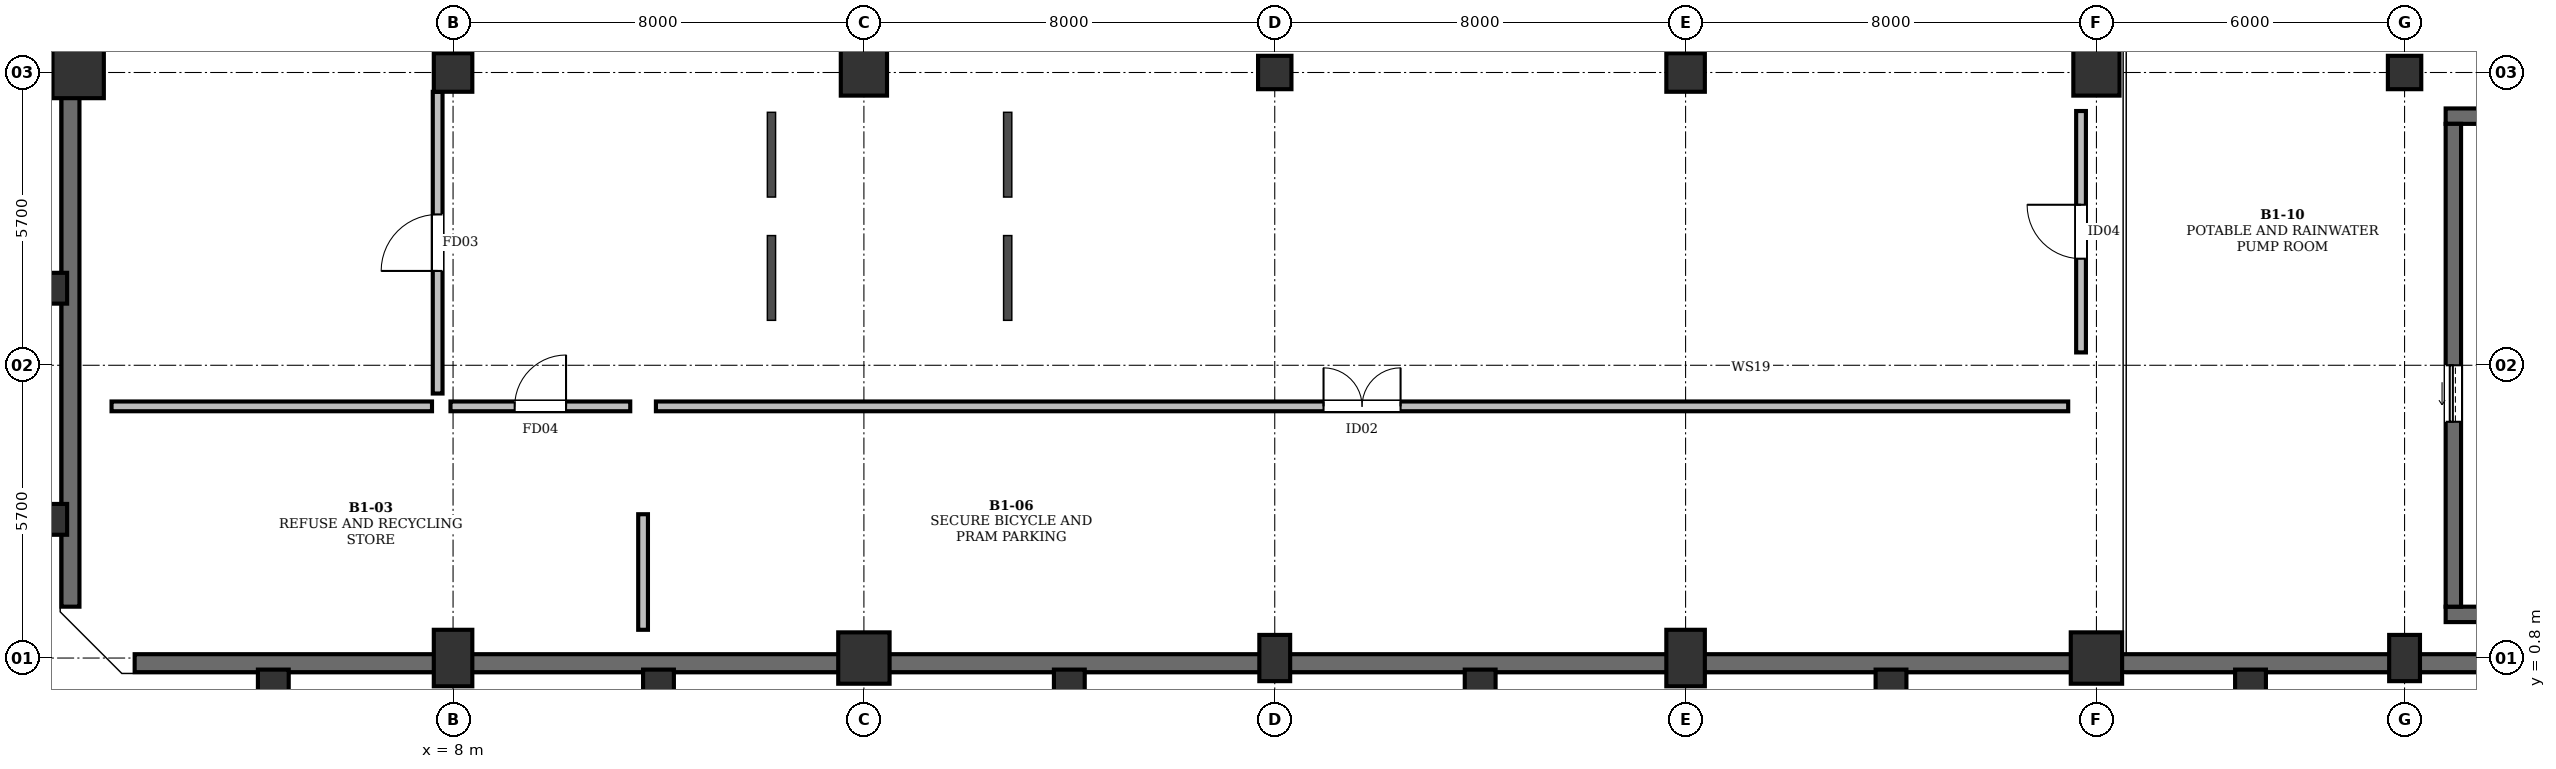
"""IFC4 building model, lengths in metres.
Left out: names, types, materials, properties, quantities, classifications, styles, units other than length and angle.
Written with IfcOpenShell. Run it as: python <this file> out.ifc"""

import sys

from ifc_helpers import new_model, si_unit, direction, frame, frame_2d, origin, origin_2d, place, context, subcontext, project, spatial, rectangle, extrude, element, fill, save


model = new_model("IFC4")
c1 = context("Model", 3, precision=1e-05, world=origin(), true_north=direction((0.0, 1.0)))
c2 = subcontext(c1, "Body", "Model", "MODEL_VIEW")
j1 = project(units=[si_unit("LENGTHUNIT", "METRE"), si_unit("PLANEANGLEUNIT", "RADIAN")], contexts=[c1])
p1 = place(None, origin())
s1 = spatial("IfcSite", under=j1, at=p1, CompositionType="ELEMENT")
p2 = place(p1, origin())
s2 = spatial("IfcBuilding", under=s1, at=p2, CompositionType="ELEMENT")
p3 = place(p2, frame((0.0, 0.0, -4.8)))
s3 = spatial("IfcBuildingStorey", under=s2, at=p3, CompositionType="ELEMENT", Elevation=-4.8)
p4 = place(p3, frame((0.7, 12.2, 0.0), z_axis=(0.0, 0.0, 1.0), x_axis=(1.0, 0.0, 0.0)))
e1 = element("IfcColumn", 1, at=p4, inside=s3, PredefinedType="COLUMN", context=c2, shape_type="SweptSolid", body=[
    extrude(rectangle(XDim=1.0, YDim=1.0, at=origin_2d()), origin(), (0.0, 0.0, 1.0), 4.8),
])
p5 = place(p3, frame((8.0, 0.8, 0.0), z_axis=(0.0, 0.0, 1.0), x_axis=(1.0, 0.0, 0.0)))
e2 = element("IfcColumn", 2, at=p5, inside=s3, PredefinedType="COLUMN", context=c2, shape_type="SweptSolid", body=[
    extrude(rectangle(XDim=0.75, YDim=1.1, at=origin_2d()), origin(), (0.0, 0.0, 1.0), 4.8),
])
p6 = place(p3, frame((8.0, 12.2, 0.0), z_axis=(0.0, 0.0, 1.0), x_axis=(1.0, 0.0, 0.0)))
e3 = element("IfcColumn", 3, at=p6, inside=s3, PredefinedType="COLUMN", context=c2, shape_type="SweptSolid", body=[
    extrude(rectangle(XDim=0.75, YDim=0.75, at=origin_2d()), origin(), (0.0, 0.0, 1.0), 4.8),
])
p7 = place(p3, frame((16.0, 0.8, 0.0), z_axis=(0.0, 0.0, 1.0), x_axis=(1.0, 0.0, 0.0)))
e4 = element("IfcColumn", 4, at=p7, inside=s3, PredefinedType="COLUMN", context=c2, shape_type="SweptSolid", body=[
    extrude(rectangle(XDim=1.0, YDim=1.0, at=origin_2d()), origin(), (0.0, 0.0, 1.0), 4.8),
])
p8 = place(p3, frame((16.0, 12.2, 0.0), z_axis=(0.0, 0.0, 1.0), x_axis=(1.0, 0.0, 0.0)))
e5 = element("IfcColumn", 5, at=p8, inside=s3, PredefinedType="COLUMN", context=c2, shape_type="SweptSolid", body=[
    extrude(rectangle(XDim=0.9, YDim=0.9, at=origin_2d()), origin(), (0.0, 0.0, 1.0), 4.8),
])
p9 = place(p3, frame((24.0, 0.8, 0.0), z_axis=(0.0, 0.0, 1.0), x_axis=(1.0, 0.0, 0.0)))
e6 = element("IfcColumn", 6, at=p9, inside=s3, PredefinedType="COLUMN", context=c2, shape_type="SweptSolid", body=[
    extrude(rectangle(XDim=0.6, YDim=0.9, at=origin_2d()), origin(), (0.0, 0.0, 1.0), 4.8),
])
p10 = place(p3, frame((24.0, 12.2, 0.0), z_axis=(0.0, 0.0, 1.0), x_axis=(1.0, 0.0, 0.0)))
e7 = element("IfcColumn", 7, at=p10, inside=s3, PredefinedType="COLUMN", context=c2, shape_type="SweptSolid", body=[
    extrude(rectangle(XDim=0.65, YDim=0.65, at=origin_2d()), origin(), (0.0, 0.0, 1.0), 4.8),
])
p11 = place(p3, frame((32.0, 0.8, 0.0), z_axis=(0.0, 0.0, 1.0), x_axis=(1.0, 0.0, 0.0)))
e8 = element("IfcColumn", 8, at=p11, inside=s3, PredefinedType="COLUMN", context=c2, shape_type="SweptSolid", body=[
    extrude(rectangle(XDim=0.75, YDim=1.1, at=origin_2d()), origin(), (0.0, 0.0, 1.0), 4.8),
])
p12 = place(p3, frame((32.0, 12.2, 0.0), z_axis=(0.0, 0.0, 1.0), x_axis=(1.0, 0.0, 0.0)))
e9 = element("IfcColumn", 9, at=p12, inside=s3, PredefinedType="COLUMN", context=c2, shape_type="SweptSolid", body=[
    extrude(rectangle(XDim=0.75, YDim=0.75, at=origin_2d()), origin(), (0.0, 0.0, 1.0), 4.8),
])
p13 = place(p3, frame((40.0, 0.8, 0.0), z_axis=(0.0, 0.0, 1.0), x_axis=(1.0, 0.0, 0.0)))
e10 = element("IfcColumn", 10, at=p13, inside=s3, PredefinedType="COLUMN", context=c2, shape_type="SweptSolid", body=[
    extrude(rectangle(XDim=1.0, YDim=1.0, at=origin_2d()), origin(), (0.0, 0.0, 1.0), 4.8),
])
p14 = place(p3, frame((40.0, 12.2, 0.0), z_axis=(0.0, 0.0, 1.0), x_axis=(1.0, 0.0, 0.0)))
e11 = element("IfcColumn", 11, at=p14, inside=s3, PredefinedType="COLUMN", context=c2, shape_type="SweptSolid", body=[
    extrude(rectangle(XDim=0.9, YDim=0.9, at=origin_2d()), origin(), (0.0, 0.0, 1.0), 4.8),
])
p15 = place(p3, frame((46.0, 0.8, 0.0), z_axis=(0.0, 0.0, 1.0), x_axis=(1.0, 0.0, 0.0)))
e12 = element("IfcColumn", 12, at=p15, inside=s3, PredefinedType="COLUMN", context=c2, shape_type="SweptSolid", body=[
    extrude(rectangle(XDim=0.6, YDim=0.9, at=origin_2d()), origin(), (0.0, 0.0, 1.0), 4.8),
])
p16 = place(p3, frame((46.0, 12.2, 0.0), z_axis=(0.0, 0.0, 1.0), x_axis=(1.0, 0.0, 0.0)))
e13 = element("IfcColumn", 13, at=p16, inside=s3, PredefinedType="COLUMN", context=c2, shape_type="SweptSolid", body=[
    extrude(rectangle(XDim=0.65, YDim=0.65, at=origin_2d()), origin(), (0.0, 0.0, 1.0), 4.8),
])
p17 = place(p3, frame((0.55, 1.8, 0.0), z_axis=(0.0, 0.0, 1.0), x_axis=(0.0, 1.0, 0.0)))
e14 = element("IfcWall", 14, at=p17, inside=s3, PredefinedType="SHEAR", context=c2, shape_type="SweptSolid", body=[
    extrude(rectangle(XDim=100.4, YDim=0.35, at=frame_2d((50.2, 0.0))), origin(), (0.0, 0.0, 1.0), 4.52),
])
p18 = place(p3, frame((1.8, 0.7, 0.0), z_axis=(0.0, 0.0, 1.0), x_axis=(1.0, 0.0, 0.0)))
e15 = element("IfcWall", 15, at=p18, inside=s3, PredefinedType="SHEAR", context=c2, shape_type="SweptSolid", body=[
    extrude(rectangle(XDim=173.2, YDim=0.35, at=frame_2d((86.6, 0.0))), origin(), (0.0, 0.0, 1.0), 4.52),
])
for number, where, z_axis, x_axis in (
    (16, (0.26, 3.5, 0.0), (0.0, 0.0, 1.0), (1.0, 0.0, 0.0)),
    (17, (0.26, 8.0, 0.0), (0.0, 0.0, 1.0), (1.0, 0.0, 0.0)),
    (18, (4.5, 0.35, 0.0), (0.0, 0.0, 1.0), (0.0, 1.0, 0.0)),
    (19, (12.0, 0.35, 0.0), (0.0, 0.0, 1.0), (0.0, 1.0, 0.0)),
    (20, (20.0, 0.35, 0.0), (0.0, 0.0, 1.0), (0.0, 1.0, 0.0)),
    (21, (28.0, 0.35, 0.0), (0.0, 0.0, 1.0), (0.0, 1.0, 0.0)),
    (22, (36.0, 0.35, 0.0), (0.0, 0.0, 1.0), (0.0, 1.0, 0.0)),
    (23, (43.0, 0.35, 0.0), (0.0, 0.0, 1.0), (0.0, 1.0, 0.0)),
):
    element("IfcColumn", number, at=place(p3, frame(where, z_axis=z_axis, x_axis=x_axis)), inside=s3, PredefinedType="PILASTER", context=c2, shape_type="SweptSolid", body=[
        extrude(rectangle(XDim=0.45, YDim=0.6, at=origin_2d()), origin(), (0.0, 0.0, 1.0), 4.8),
    ])
for number, where, z_axis, x_axis in (
    (24, (46.8, 1.65, 0.0), (0.0, 0.0, 1.0), (1.0, 0.0, 0.0)),
    (25, (46.8, 11.35, 0.0), (0.0, 0.0, 1.0), (1.0, 0.0, 0.0)),
):
    element("IfcWall", number, at=place(p3, frame(where, z_axis=z_axis, x_axis=x_axis)), inside=s3, PredefinedType="SHEAR", context=c2, shape_type="SweptSolid", body=[
        extrude(rectangle(XDim=8.0, YDim=0.3, at=frame_2d((4.0, 0.0))), origin(), (0.0, 0.0, 1.0), 4.52),
    ])
p19 = place(p3, frame((46.95, 1.8, 0.0), z_axis=(0.0, 0.0, 1.0), x_axis=(0.0, 1.0, 0.0)))
e26 = element("IfcWall", 26, at=p19, inside=s3, PredefinedType="SHEAR", context=c2, shape_type="SweptSolid", body=[
    extrude(rectangle(XDim=9.4, YDim=0.3, at=frame_2d((4.7, 0.0))), origin(), (0.0, 0.0, 1.0), 4.52),
])
p20 = place(p19, frame((3.6, 0.0, 0.0)))
e27 = element("IfcOpeningElement", 27, at=p20, cuts=e26, PredefinedType="OPENING", context=c2, shape_type="SweptSolid", body=[
    extrude(rectangle(XDim=1.1, YDim=2.2, at=frame_2d((0.55, 1.1))), frame((0.0, 0.162, 0.0), z_axis=(0.0, -1.0, 0.0), x_axis=(1.0, 0.0, 0.0)), (0.0, 0.0, 1.0), 0.324),
])
p21 = place(p3, frame((7.7, 5.95, 0.0), z_axis=(0.0, 0.0, 1.0), x_axis=(0.0, 1.0, 0.0)))
e28 = element("IfcWall", 28, at=p21, inside=s3, PredefinedType="SOLIDWALL", context=c2, shape_type="SweptSolid", body=[
    extrude(rectangle(XDim=5.873, YDim=0.19, at=frame_2d((2.937, 0.0))), origin(), (0.0, 0.0, 1.0), 3.255),
])
p22 = place(p21, frame((2.386, 0.0, 0.0)))
e29 = element("IfcOpeningElement", 29, at=p22, cuts=e28, PredefinedType="OPENING", context=c2, shape_type="SweptSolid", body=[
    extrude(rectangle(XDim=1.1, YDim=2.2, at=frame_2d((0.55, 1.1))), frame((0.0, 0.107, 0.0), z_axis=(0.0, -1.0, 0.0), x_axis=(1.0, 0.0, 0.0)), (0.0, 0.0, 1.0), 0.214),
])
p23 = place(p3, frame((7.95, 5.7, 0.0), z_axis=(0.0, 0.0, 1.0), x_axis=(1.0, 0.0, 0.0)))
e30 = element("IfcWall", 30, at=p23, inside=s3, PredefinedType="SOLIDWALL", context=c2, shape_type="SweptSolid", body=[
    extrude(rectangle(XDim=3.5, YDim=0.19, at=frame_2d((1.75, 0.0))), origin(), (0.0, 0.0, 1.0), 3.605),
])
p24 = place(p23, frame((1.25, 0.0, 0.0)))
e31 = element("IfcOpeningElement", 31, at=p24, cuts=e30, PredefinedType="OPENING", context=c2, shape_type="SweptSolid", body=[
    extrude(rectangle(XDim=1.0, YDim=2.2, at=frame_2d((0.5, 1.1))), frame((0.0, 0.107, 0.0), z_axis=(0.0, -1.0, 0.0), x_axis=(1.0, 0.0, 0.0)), (0.0, 0.0, 1.0), 0.214),
])
p25 = place(p3, frame((11.95, 5.7, 0.0), z_axis=(0.0, 0.0, 1.0), x_axis=(1.0, 0.0, 0.0)))
e32 = element("IfcWall", 32, at=p25, inside=s3, PredefinedType="SOLIDWALL", context=c2, shape_type="SweptSolid", body=[
    extrude(rectangle(XDim=27.5, YDim=0.19, at=frame_2d((13.75, 0.0))), origin(), (0.0, 0.0, 1.0), 3.605),
])
p26 = place(p25, frame((13.0, 0.0, 0.0)))
e33 = element("IfcOpeningElement", 33, at=p26, cuts=e32, PredefinedType="OPENING", context=c2, shape_type="SweptSolid", body=[
    extrude(rectangle(XDim=1.5, YDim=2.2, at=frame_2d((0.75, 1.1))), frame((0.0, 0.107, 0.0), z_axis=(0.0, -1.0, 0.0), x_axis=(1.0, 0.0, 0.0)), (0.0, 0.0, 1.0), 0.214),
])
p27 = place(p3, frame((39.7, 6.75, 0.0), z_axis=(0.0, 0.0, 1.0), x_axis=(0.0, 1.0, 0.0)))
e34 = element("IfcWall", 34, at=p27, inside=s3, PredefinedType="SOLIDWALL", context=c2, shape_type="SweptSolid", body=[
    extrude(rectangle(XDim=4.7, YDim=0.19, at=frame_2d((2.35, 0.0))), origin(), (0.0, 0.0, 1.0), 3.605),
])
p28 = place(p27, frame((1.825, 0.0, 0.0)))
e35 = element("IfcOpeningElement", 35, at=p28, cuts=e34, PredefinedType="OPENING", context=c2, shape_type="SweptSolid", body=[
    extrude(rectangle(XDim=1.05, YDim=2.15, at=frame_2d((0.525, 1.075))), frame((0.0, 0.107, 0.0), z_axis=(0.0, -1.0, 0.0), x_axis=(1.0, 0.0, 0.0)), (0.0, 0.0, 1.0), 0.214),
])
p29 = place(p3, frame((1.35, 5.7, 0.0), z_axis=(0.0, 0.0, 1.0), x_axis=(1.0, 0.0, 0.0)))
e36 = element("IfcWall", 36, at=p29, inside=s3, PredefinedType="SOLIDWALL", context=c2, shape_type="SweptSolid", body=[
    extrude(rectangle(XDim=6.24, YDim=0.19, at=frame_2d((3.12, 0.0))), origin(), (0.0, 0.0, 1.0), 3.605),
])
p30 = place(p3, frame((11.7, 1.35, 0.0), z_axis=(0.0, 0.0, 1.0), x_axis=(0.0, 1.0, 0.0)))
e37 = element("IfcWall", 37, at=p30, inside=s3, PredefinedType="SOLIDWALL", context=c2, shape_type="SweptSolid", body=[
    extrude(rectangle(XDim=2.25, YDim=0.19, at=frame_2d((1.125, 0.0))), origin(), (0.0, 0.0, 1.0), 4.099),
])
p31 = place(p20, origin())
e38 = element("IfcDoor", 38, at=p31, inside=s3, OperationType="SLIDING_TO_LEFT", PredefinedType="DOOR", context=c2, shape_type="SweptSolid", body=[
    extrude(rectangle(XDim=1.1, YDim=2.2, at=frame_2d((0.55, 1.1))), frame((0.0, 0.025, 0.0), z_axis=(0.0, -1.0, 0.0), x_axis=(1.0, 0.0, 0.0)), (0.0, 0.0, 1.0), 0.05),
])
fill(e27, e38)
p32 = place(p22, origin())
e39 = element("IfcDoor", 39, at=p32, inside=s3, OperationType="SINGLE_SWING_LEFT", PredefinedType="DOOR", context=c2, shape_type="SweptSolid", body=[
    extrude(rectangle(XDim=1.1, YDim=2.2, at=frame_2d((0.55, 1.1))), frame((0.0, 0.025, 0.0), z_axis=(0.0, -1.0, 0.0), x_axis=(1.0, 0.0, 0.0)), (0.0, 0.0, 1.0), 0.05),
])
fill(e29, e39)
p33 = place(p24, origin())
e40 = element("IfcDoor", 40, at=p33, inside=s3, OperationType="SINGLE_SWING_RIGHT", PredefinedType="DOOR", context=c2, shape_type="SweptSolid", body=[
    extrude(rectangle(XDim=1.0, YDim=2.2, at=frame_2d((0.5, 1.1))), frame((0.0, 0.025, 0.0), z_axis=(0.0, -1.0, 0.0), x_axis=(1.0, 0.0, 0.0)), (0.0, 0.0, 1.0), 0.05),
])
fill(e31, e40)
p34 = place(p26, origin())
e41 = element("IfcDoor", 41, at=p34, inside=s3, OperationType="DOUBLE_DOOR_SINGLE_SWING", PredefinedType="DOOR", context=c2, shape_type="SweptSolid", body=[
    extrude(rectangle(XDim=1.5, YDim=2.2, at=frame_2d((0.75, 1.1))), frame((0.0, 0.025, 0.0), z_axis=(0.0, -1.0, 0.0), x_axis=(1.0, 0.0, 0.0)), (0.0, 0.0, 1.0), 0.05),
])
fill(e33, e41)
p35 = place(p28, origin())
e42 = element("IfcDoor", 42, at=p35, inside=s3, OperationType="SINGLE_SWING_RIGHT", PredefinedType="DOOR", context=c2, shape_type="SweptSolid", body=[
    extrude(rectangle(XDim=1.05, YDim=2.15, at=frame_2d((0.525, 1.075))), frame((0.0, 0.025, 0.0), z_axis=(0.0, -1.0, 0.0), x_axis=(1.0, 0.0, 0.0)), (0.0, 0.0, 1.0), 0.05),
])
fill(e35, e42)
save(model, sys.argv[1])
